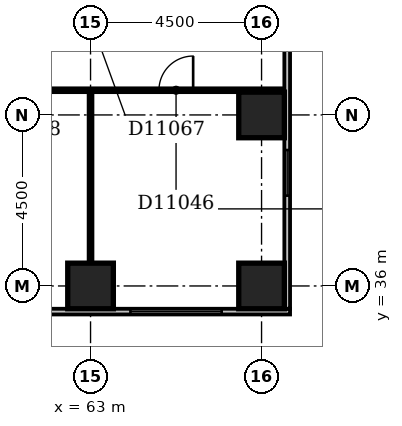
"""IFC4 building model, lengths in metres.
Left out: names, types, materials, properties, quantities, classifications, styles, units other than length and angle.
Written with IfcOpenShell. Run it as: python <this file> out.ifc"""

import sys

from ifc_helpers import new_model, si_unit, direction, frame, frame_2d, origin, origin_2d, place, context, subcontext, project, spatial, rectangle, extrude, element, fill, save


model = new_model("IFC4")
c1 = context("Model", 3, precision=1e-05, world=origin(), true_north=direction((0.0, 1.0)))
c2 = subcontext(c1, "Body", "Model", "MODEL_VIEW")
j1 = project(units=[si_unit("LENGTHUNIT", "METRE"), si_unit("PLANEANGLEUNIT", "RADIAN")], contexts=[c1])
p1 = place(None, origin())
s1 = spatial("IfcSite", under=j1, at=p1, CompositionType="ELEMENT")
p2 = place(p1, origin())
s2 = spatial("IfcBuilding", under=s1, at=p2, CompositionType="ELEMENT")
p3 = place(p2, frame((0.0, 0.0, 50.6)))
s3 = spatial("IfcBuildingStorey", under=s2, at=p3, CompositionType="ELEMENT", Elevation=50.6)
for number, where, z_axis, x_axis in (
    (1, (63.0, 36.0, -0.3), (0.0, 0.0, 1.0), (1.0, 0.0, 0.0)),
    (2, (67.5, 36.0, -0.3), (0.0, 0.0, 1.0), (1.0, 0.0, 0.0)),
    (3, (67.5, 40.5, -0.3), (0.0, 0.0, 1.0), (1.0, 0.0, 0.0)),
):
    element("IfcColumn", number, at=place(p3, frame(where, z_axis=z_axis, x_axis=x_axis)), inside=s3, PredefinedType="COLUMN", context=c2, shape_type="SweptSolid", body=[
        extrude(rectangle(XDim=1.2, YDim=1.2, at=origin_2d()), origin(), (0.0, 0.0, 1.0), 3.6),
    ])
p4 = place(p3, frame((23.1, 35.325, 0.0), z_axis=(0.0, 0.0, 1.0), x_axis=(1.0, 0.0, 0.0)))
e4 = element("IfcWall", 4, at=p4, inside=s3, PredefinedType="STANDARD", context=c2, shape_type="SweptSolid", body=[
    extrude(rectangle(XDim=45.15, YDim=0.15, at=frame_2d((22.575, 0.0))), origin(), (0.0, 0.0, 1.0), 2.7),
])
p5 = place(p4, frame((0.235, 0.0, 0.6)))
e5 = element("IfcOpeningElement", 5, at=p5, cuts=e4, PredefinedType="OPENING", context=c2, shape_type="SweptSolid", body=[
    extrude(rectangle(XDim=0.45, YDim=1.8, at=frame_2d((0.225, 0.9))), frame((0.0, 0.087, 0.0), z_axis=(0.0, -1.0, 0.0), x_axis=(1.0, 0.0, 0.0)), (0.0, 0.0, 1.0), 0.174),
])
p6 = place(p4, frame((2.605, 0.0, 0.6)))
e6 = element("IfcOpeningElement", 6, at=p6, cuts=e4, PredefinedType="OPENING", context=c2, shape_type="SweptSolid", body=[
    extrude(rectangle(XDim=0.45, YDim=1.8, at=frame_2d((0.225, 0.9))), frame((0.0, 0.087, 0.0), z_axis=(0.0, -1.0, 0.0), x_axis=(1.0, 0.0, 0.0)), (0.0, 0.0, 1.0), 0.174),
])
p7 = place(p4, frame((4.95, 0.0, 0.6)))
e7 = element("IfcOpeningElement", 7, at=p7, cuts=e4, PredefinedType="OPENING", context=c2, shape_type="SweptSolid", body=[
    extrude(rectangle(XDim=2.4, YDim=1.8, at=frame_2d((1.2, 0.9))), frame((0.0, 0.087, 0.0), z_axis=(0.0, -1.0, 0.0), x_axis=(1.0, 0.0, 0.0)), (0.0, 0.0, 1.0), 0.174),
])
p8 = place(p4, frame((9.45, 0.0, 0.6)))
e8 = element("IfcOpeningElement", 8, at=p8, cuts=e4, PredefinedType="OPENING", context=c2, shape_type="SweptSolid", body=[
    extrude(rectangle(XDim=2.4, YDim=1.8, at=frame_2d((1.2, 0.9))), frame((0.0, 0.087, 0.0), z_axis=(0.0, -1.0, 0.0), x_axis=(1.0, 0.0, 0.0)), (0.0, 0.0, 1.0), 0.174),
])
p9 = place(p4, frame((13.95, 0.0, 0.6)))
e9 = element("IfcOpeningElement", 9, at=p9, cuts=e4, PredefinedType="OPENING", context=c2, shape_type="SweptSolid", body=[
    extrude(rectangle(XDim=2.4, YDim=1.8, at=frame_2d((1.2, 0.9))), frame((0.0, 0.087, 0.0), z_axis=(0.0, -1.0, 0.0), x_axis=(1.0, 0.0, 0.0)), (0.0, 0.0, 1.0), 0.174),
])
p10 = place(p4, frame((18.45, 0.0, 0.6)))
e10 = element("IfcOpeningElement", 10, at=p10, cuts=e4, PredefinedType="OPENING", context=c2, shape_type="SweptSolid", body=[
    extrude(rectangle(XDim=2.4, YDim=1.8, at=frame_2d((1.2, 0.9))), frame((0.0, 0.087, 0.0), z_axis=(0.0, -1.0, 0.0), x_axis=(1.0, 0.0, 0.0)), (0.0, 0.0, 1.0), 0.174),
])
p11 = place(p4, frame((22.823, 0.0, 0.6)))
e11 = element("IfcOpeningElement", 11, at=p11, cuts=e4, PredefinedType="OPENING", context=c2, shape_type="SweptSolid", body=[
    extrude(rectangle(XDim=1.2, YDim=1.8, at=frame_2d((0.6, 0.9))), frame((0.0, 0.087, 0.0), z_axis=(0.0, -1.0, 0.0), x_axis=(1.0, 0.0, 0.0)), (0.0, 0.0, 1.0), 0.174),
])
p12 = place(p4, frame((29.403, 0.0, 0.6)))
e12 = element("IfcOpeningElement", 12, at=p12, cuts=e4, PredefinedType="OPENING", context=c2, shape_type="SweptSolid", body=[
    extrude(rectangle(XDim=0.6, YDim=1.8, at=frame_2d((0.3, 0.9))), frame((0.0, 0.087, 0.0), z_axis=(0.0, -1.0, 0.0), x_axis=(1.0, 0.0, 0.0)), (0.0, 0.0, 1.0), 0.174),
])
p13 = place(p4, frame((31.95, 0.0, 0.6)))
e13 = element("IfcOpeningElement", 13, at=p13, cuts=e4, PredefinedType="OPENING", context=c2, shape_type="SweptSolid", body=[
    extrude(rectangle(XDim=2.4, YDim=1.8, at=frame_2d((1.2, 0.9))), frame((0.0, 0.087, 0.0), z_axis=(0.0, -1.0, 0.0), x_axis=(1.0, 0.0, 0.0)), (0.0, 0.0, 1.0), 0.174),
])
p14 = place(p4, frame((36.45, 0.0, 0.6)))
e14 = element("IfcOpeningElement", 14, at=p14, cuts=e4, PredefinedType="OPENING", context=c2, shape_type="SweptSolid", body=[
    extrude(rectangle(XDim=2.4, YDim=1.8, at=frame_2d((1.2, 0.9))), frame((0.0, 0.087, 0.0), z_axis=(0.0, -1.0, 0.0), x_axis=(1.0, 0.0, 0.0)), (0.0, 0.0, 1.0), 0.174),
])
p15 = place(p4, frame((40.95, 0.0, 0.6)))
e15 = element("IfcOpeningElement", 15, at=p15, cuts=e4, PredefinedType="OPENING", context=c2, shape_type="SweptSolid", body=[
    extrude(rectangle(XDim=2.4, YDim=1.8, at=frame_2d((1.2, 0.9))), frame((0.0, 0.087, 0.0), z_axis=(0.0, -1.0, 0.0), x_axis=(1.0, 0.0, 0.0)), (0.0, 0.0, 1.0), 0.174),
])
p16 = place(p3, frame((68.175, 35.4, 0.0), z_axis=(0.0, 0.0, 1.0), x_axis=(0.0, 1.0, 0.0)))
e16 = element("IfcWall", 16, at=p16, inside=s3, PredefinedType="STANDARD", context=c2, shape_type="SweptSolid", body=[
    extrude(rectangle(XDim=23.85, YDim=0.15, at=frame_2d((11.925, 0.0))), origin(), (0.0, 0.0, 1.0), 2.7),
])
p17 = place(p16, frame((2.977, 0.0, 0.6)))
e17 = element("IfcOpeningElement", 17, at=p17, cuts=e16, PredefinedType="OPENING", context=c2, shape_type="SweptSolid", body=[
    extrude(rectangle(XDim=1.2, YDim=1.8, at=frame_2d((0.6, 0.9))), frame((0.0, 0.087, 0.0), z_axis=(0.0, -1.0, 0.0), x_axis=(1.0, 0.0, 0.0)), (0.0, 0.0, 1.0), 0.174),
])
p18 = place(p16, frame((10.65, 0.0, 0.6)))
e18 = element("IfcOpeningElement", 18, at=p18, cuts=e16, PredefinedType="OPENING", context=c2, shape_type="SweptSolid", body=[
    extrude(rectangle(XDim=2.4, YDim=1.8, at=frame_2d((1.2, 0.9))), frame((0.0, 0.087, 0.0), z_axis=(0.0, -1.0, 0.0), x_axis=(1.0, 0.0, 0.0)), (0.0, 0.0, 1.0), 0.174),
])
p19 = place(p16, frame((19.545, 0.0, 0.6)))
e19 = element("IfcOpeningElement", 19, at=p19, cuts=e16, PredefinedType="OPENING", context=c2, shape_type="SweptSolid", body=[
    extrude(rectangle(XDim=1.8, YDim=1.8, at=frame_2d((0.9, 0.9))), frame((0.0, 0.087, 0.0), z_axis=(0.0, -1.0, 0.0), x_axis=(1.0, 0.0, 0.0)), (0.0, 0.0, 1.0), 0.174),
])
p20 = place(p3, frame((63.0, 36.6, 0.0), z_axis=(0.0, 0.0, 1.0), x_axis=(0.0, 1.0, 0.0)))
e20 = element("IfcWall", 20, at=p20, inside=s3, PredefinedType="PARTITIONING", context=c2, shape_type="SweptSolid", body=[
    extrude(rectangle(XDim=4.5, YDim=0.1, at=frame_2d((2.25, 0.0))), origin(), (0.0, 0.0, 1.0), 2.4),
])
p21 = place(p3, frame((54.1, 41.15, 0.0), z_axis=(0.0, 0.0, 1.0), x_axis=(1.0, 0.0, 0.0)))
e21 = element("IfcWall", 21, at=p21, inside=s3, PredefinedType="PARTITIONING", context=c2, shape_type="SweptSolid", body=[
    extrude(rectangle(XDim=14.0, YDim=0.1, at=frame_2d((7.0, 0.0))), origin(), (0.0, 0.0, 1.0), 3.3),
])
p22 = place(p21, frame((1.7, 0.0, 0.0)))
e22 = element("IfcOpeningElement", 22, at=p22, cuts=e21, PredefinedType="OPENING", context=c2, shape_type="SweptSolid", body=[
    extrude(rectangle(XDim=0.9, YDim=2.1, at=frame_2d((0.45, 1.05))), frame((0.0, 0.062, 0.0), z_axis=(0.0, -1.0, 0.0), x_axis=(1.0, 0.0, 0.0)), (0.0, 0.0, 1.0), 0.124),
])
p23 = place(p21, frame((6.2, 0.0, 0.0)))
e23 = element("IfcOpeningElement", 23, at=p23, cuts=e21, PredefinedType="OPENING", context=c2, shape_type="SweptSolid", body=[
    extrude(rectangle(XDim=0.9, YDim=2.1, at=frame_2d((0.45, 1.05))), frame((0.0, 0.062, 0.0), z_axis=(0.0, -1.0, 0.0), x_axis=(1.0, 0.0, 0.0)), (0.0, 0.0, 1.0), 0.124),
])
p24 = place(p21, frame((10.7, 0.0, 0.0)))
e24 = element("IfcOpeningElement", 24, at=p24, cuts=e21, PredefinedType="OPENING", context=c2, shape_type="SweptSolid", body=[
    extrude(rectangle(XDim=0.9, YDim=2.1, at=frame_2d((0.45, 1.05))), frame((0.0, 0.062, 0.0), z_axis=(0.0, -1.0, 0.0), x_axis=(1.0, 0.0, 0.0)), (0.0, 0.0, 1.0), 0.124),
])
p25 = place(p15, origin())
e25 = element("IfcWindow", 25, at=p25, inside=s3, PartitioningType="SINGLE_PANEL", PredefinedType="WINDOW", context=c2, shape_type="SweptSolid", body=[
    extrude(rectangle(XDim=2.4, YDim=1.8, at=frame_2d((1.2, 0.9))), frame((0.0, 0.03, 0.0), z_axis=(0.0, -1.0, 0.0), x_axis=(1.0, 0.0, 0.0)), (0.0, 0.0, 1.0), 0.06),
])
fill(e15, e25)
p26 = place(p17, origin())
e26 = element("IfcWindow", 26, at=p26, inside=s3, PartitioningType="SINGLE_PANEL", PredefinedType="WINDOW", context=c2, shape_type="SweptSolid", body=[
    extrude(rectangle(XDim=1.2, YDim=1.8, at=frame_2d((0.6, 0.9))), frame((0.0, 0.03, 0.0), z_axis=(0.0, -1.0, 0.0), x_axis=(1.0, 0.0, 0.0)), (0.0, 0.0, 1.0), 0.06),
])
fill(e17, e26)
p27 = place(p24, frame((0.9, 0.0, 0.0), z_axis=(0.0, 0.0, 1.0), x_axis=(-1.0, 0.0, 0.0)))
e27 = element("IfcDoor", 27, at=p27, inside=s3, OperationType="SINGLE_SWING_LEFT", PredefinedType="DOOR", context=c2, shape_type="SweptSolid", body=[
    extrude(rectangle(XDim=0.9, YDim=2.1, at=frame_2d((0.45, 1.05))), frame((0.0, 0.025, 0.0), z_axis=(0.0, -1.0, 0.0), x_axis=(1.0, 0.0, 0.0)), (0.0, 0.0, 1.0), 0.05),
])
fill(e24, e27)
save(model, sys.argv[1])
